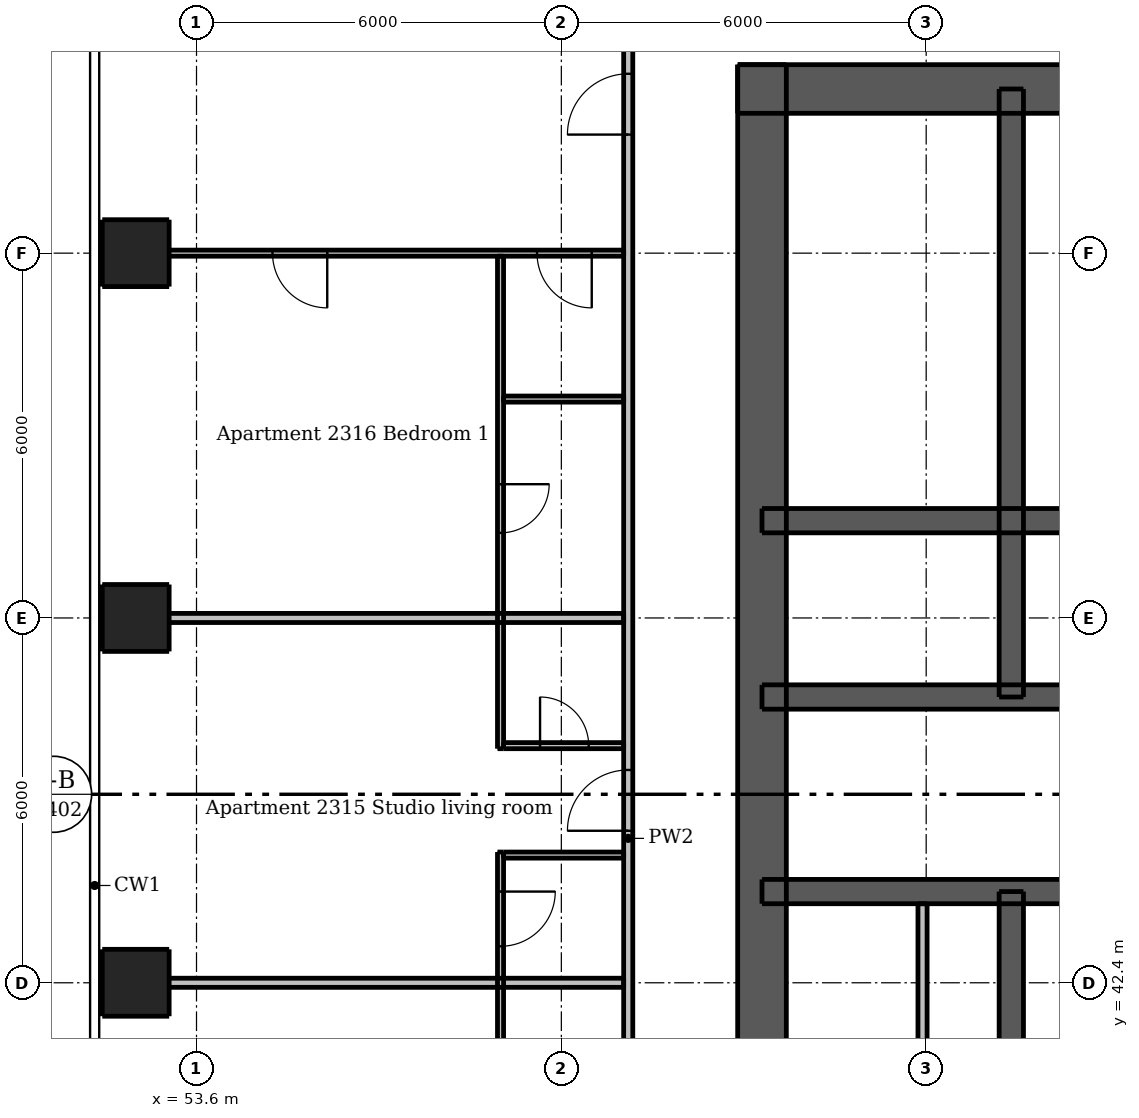
"""IFC4 building model, lengths in metres.
Left out: names, types, materials, properties, quantities, classifications, styles, units other than length and angle.
Written with IfcOpenShell. Run it as: python <this file> out.ifc"""

import sys

from ifc_helpers import new_model, si_unit, direction, frame, frame_2d, origin, origin_2d, place, context, subcontext, project, spatial, rectangle, extrude, element, fill, save


model = new_model("IFC4")
c1 = context("Model", 3, precision=1e-05, world=origin(), true_north=direction((0.0, 1.0)))
c2 = subcontext(c1, "Body", "Model", "MODEL_VIEW")
j1 = project(units=[si_unit("LENGTHUNIT", "METRE"), si_unit("PLANEANGLEUNIT", "RADIAN")], contexts=[c1])
p1 = place(None, origin())
s1 = spatial("IfcSite", under=j1, at=p1, CompositionType="ELEMENT")
p2 = place(p1, origin())
s2 = spatial("IfcBuilding", under=s1, at=p2, CompositionType="ELEMENT")
p3 = place(p2, frame((0.0, 0.0, 88.6)))
s3 = spatial("IfcBuildingStorey", under=s2, at=p3, CompositionType="ELEMENT", Elevation=88.6)
p4 = place(p3, frame((62.5, 57.1, 0.0), z_axis=(0.0, 0.0, 1.0), x_axis=(1.0, 0.0, 0.0)))
e1 = element("IfcWall", 1, at=p4, inside=s3, PredefinedType="SHEAR", context=c2, shape_type="SweptSolid", body=[
    extrude(rectangle(XDim=24.0, YDim=0.8, at=frame_2d((12.0, 0.0))), origin(), (0.0, 0.0, 1.0), 3.05),
])
p5 = place(p4, frame((20.9, 0.0, 0.0)))
e2 = element("IfcOpeningElement", 2, at=p5, cuts=e1, PredefinedType="OPENING", context=c2, shape_type="SweptSolid", body=[
    extrude(rectangle(XDim=1.1, YDim=2.1, at=frame_2d((0.55, 1.05))), frame((0.0, 0.41, 0.0), z_axis=(0.0, -1.0, 0.0), x_axis=(1.0, 0.0, 0.0)), (0.0, 0.0, 1.0), 0.82),
])
p6 = place(p4, frame((2.0, 0.0, 0.0)))
e3 = element("IfcOpeningElement", 3, at=p6, cuts=e1, PredefinedType="OPENING", context=c2, shape_type="SweptSolid", body=[
    extrude(rectangle(XDim=1.1, YDim=2.1, at=frame_2d((0.55, 1.05))), frame((0.0, 0.41, 0.0), z_axis=(0.0, -1.0, 0.0), x_axis=(1.0, 0.0, 0.0)), (0.0, 0.0, 1.0), 0.82),
])
p7 = place(p4, frame((11.55, 0.0, 0.0)))
e4 = element("IfcOpeningElement", 4, at=p7, cuts=e1, PredefinedType="OPENING", context=c2, shape_type="SweptSolid", body=[
    extrude(rectangle(XDim=0.9, YDim=2.1, at=frame_2d((0.45, 1.05))), frame((0.0, 0.41, 0.0), z_axis=(0.0, -1.0, 0.0), x_axis=(1.0, 0.0, 0.0)), (0.0, 0.0, 1.0), 0.82),
])
p8 = place(p3, frame((62.9, 33.5, 0.0), z_axis=(0.0, 0.0, 1.0), x_axis=(0.0, 1.0, 0.0)))
e5 = element("IfcWall", 5, at=p8, inside=s3, PredefinedType="SHEAR", context=c2, shape_type="SweptSolid", body=[
    extrude(rectangle(XDim=24.0, YDim=0.8, at=frame_2d((12.0, 0.0))), origin(), (0.0, 0.0, 1.0), 3.05),
])
p9 = place(p8, frame((11.2, 0.0, 0.0)))
e6 = element("IfcOpeningElement", 6, at=p9, cuts=e5, PredefinedType="OPENING", context=c2, shape_type="SweptSolid", body=[
    extrude(rectangle(XDim=1.6, YDim=2.1, at=frame_2d((0.8, 1.05))), frame((0.0, 0.41, 0.0), z_axis=(0.0, -1.0, 0.0), x_axis=(1.0, 0.0, 0.0)), (0.0, 0.0, 1.0), 0.82),
])
p10 = place(p3, frame((62.9, 43.9, 0.0), z_axis=(0.0, 0.0, 1.0), x_axis=(1.0, 0.0, 0.0)))
e7 = element("IfcWall", 7, at=p10, inside=s3, PredefinedType="SHEAR", context=c2, shape_type="SweptSolid", body=[
    extrude(rectangle(XDim=23.2, YDim=0.4, at=frame_2d((11.6, 0.0))), origin(), (0.0, 0.0, 1.0), 3.05),
])
p11 = place(p10, frame((1.07, 0.0, 0.0)))
e8 = element("IfcOpeningElement", 8, at=p11, cuts=e7, PredefinedType="OPENING", context=c2, shape_type="SweptSolid", body=[
    extrude(rectangle(XDim=0.9, YDim=2.1, at=frame_2d((0.45, 1.05))), frame((0.0, 0.21, 0.0), z_axis=(0.0, -1.0, 0.0), x_axis=(1.0, 0.0, 0.0)), (0.0, 0.0, 1.0), 0.42),
])
p12 = place(p10, frame((2.87, 0.0, 0.0)))
e9 = element("IfcOpeningElement", 9, at=p12, cuts=e7, PredefinedType="OPENING", context=c2, shape_type="SweptSolid", body=[
    extrude(rectangle(XDim=0.8, YDim=2.1, at=frame_2d((0.4, 1.05))), frame((0.0, 0.21, 0.0), z_axis=(0.0, -1.0, 0.0), x_axis=(1.0, 0.0, 0.0)), (0.0, 0.0, 1.0), 0.42),
])
p13 = place(p10, frame((20.6, 0.0, 0.0)))
e10 = element("IfcOpeningElement", 10, at=p13, cuts=e7, PredefinedType="OPENING", context=c2, shape_type="SweptSolid", body=[
    extrude(rectangle(XDim=0.9, YDim=2.1, at=frame_2d((0.45, 1.05))), frame((0.0, 0.21, 0.0), z_axis=(0.0, -1.0, 0.0), x_axis=(1.0, 0.0, 0.0)), (0.0, 0.0, 1.0), 0.42),
])
p14 = place(p10, frame((4.8, 0.0, 0.0)))
e11 = element("IfcOpeningElement", 11, at=p14, cuts=e7, PredefinedType="OPENING", context=c2, shape_type="SweptSolid", body=[
    extrude(rectangle(XDim=1.1, YDim=2.1, at=frame_2d((0.55, 1.05))), frame((0.0, 0.21, 0.0), z_axis=(0.0, -1.0, 0.0), x_axis=(1.0, 0.0, 0.0)), (0.0, 0.0, 1.0), 0.42),
])
p15 = place(p10, frame((7.3, 0.0, 0.0)))
e12 = element("IfcOpeningElement", 12, at=p15, cuts=e7, PredefinedType="OPENING", context=c2, shape_type="SweptSolid", body=[
    extrude(rectangle(XDim=1.1, YDim=2.1, at=frame_2d((0.55, 1.05))), frame((0.0, 0.21, 0.0), z_axis=(0.0, -1.0, 0.0), x_axis=(1.0, 0.0, 0.0)), (0.0, 0.0, 1.0), 0.42),
])
p16 = place(p10, frame((9.8, 0.0, 0.0)))
e13 = element("IfcOpeningElement", 13, at=p16, cuts=e7, PredefinedType="OPENING", context=c2, shape_type="SweptSolid", body=[
    extrude(rectangle(XDim=1.1, YDim=2.1, at=frame_2d((0.55, 1.05))), frame((0.0, 0.21, 0.0), z_axis=(0.0, -1.0, 0.0), x_axis=(1.0, 0.0, 0.0)), (0.0, 0.0, 1.0), 0.42),
])
p17 = place(p10, frame((12.3, 0.0, 0.0)))
e14 = element("IfcOpeningElement", 14, at=p17, cuts=e7, PredefinedType="OPENING", context=c2, shape_type="SweptSolid", body=[
    extrude(rectangle(XDim=1.1, YDim=2.1, at=frame_2d((0.55, 1.05))), frame((0.0, 0.21, 0.0), z_axis=(0.0, -1.0, 0.0), x_axis=(1.0, 0.0, 0.0)), (0.0, 0.0, 1.0), 0.42),
])
p18 = place(p10, frame((14.8, 0.0, 0.0)))
e15 = element("IfcOpeningElement", 15, at=p18, cuts=e7, PredefinedType="OPENING", context=c2, shape_type="SweptSolid", body=[
    extrude(rectangle(XDim=1.1, YDim=2.1, at=frame_2d((0.55, 1.05))), frame((0.0, 0.21, 0.0), z_axis=(0.0, -1.0, 0.0), x_axis=(1.0, 0.0, 0.0)), (0.0, 0.0, 1.0), 0.42),
])
p19 = place(p10, frame((17.3, 0.0, 0.0)))
e16 = element("IfcOpeningElement", 16, at=p19, cuts=e7, PredefinedType="OPENING", context=c2, shape_type="SweptSolid", body=[
    extrude(rectangle(XDim=1.1, YDim=2.1, at=frame_2d((0.55, 1.05))), frame((0.0, 0.21, 0.0), z_axis=(0.0, -1.0, 0.0), x_axis=(1.0, 0.0, 0.0)), (0.0, 0.0, 1.0), 0.42),
])
p20 = place(p3, frame((62.9, 47.1, 0.0), z_axis=(0.0, 0.0, 1.0), x_axis=(1.0, 0.0, 0.0)))
e17 = element("IfcWall", 17, at=p20, inside=s3, PredefinedType="SHEAR", context=c2, shape_type="SweptSolid", body=[
    extrude(rectangle(XDim=23.2, YDim=0.4, at=frame_2d((11.6, 0.0))), origin(), (0.0, 0.0, 1.0), 3.05),
])
p21 = place(p20, frame((1.7, 0.0, 0.0)))
e18 = element("IfcOpeningElement", 18, at=p21, cuts=e17, PredefinedType="OPENING", context=c2, shape_type="SweptSolid", body=[
    extrude(rectangle(XDim=0.9, YDim=2.1, at=frame_2d((0.45, 1.05))), frame((0.0, 0.21, 0.0), z_axis=(0.0, -1.0, 0.0), x_axis=(1.0, 0.0, 0.0)), (0.0, 0.0, 1.0), 0.42),
])
p22 = place(p20, frame((20.6, 0.0, 0.0)))
e19 = element("IfcOpeningElement", 19, at=p22, cuts=e17, PredefinedType="OPENING", context=c2, shape_type="SweptSolid", body=[
    extrude(rectangle(XDim=0.9, YDim=2.1, at=frame_2d((0.45, 1.05))), frame((0.0, 0.21, 0.0), z_axis=(0.0, -1.0, 0.0), x_axis=(1.0, 0.0, 0.0)), (0.0, 0.0, 1.0), 0.42),
])
p23 = place(p3, frame((62.9, 50.0, 0.0), z_axis=(0.0, 0.0, 1.0), x_axis=(1.0, 0.0, 0.0)))
e20 = element("IfcWall", 20, at=p23, inside=s3, PredefinedType="SHEAR", context=c2, shape_type="SweptSolid", body=[
    extrude(rectangle(XDim=23.2, YDim=0.4, at=frame_2d((11.6, 0.0))), origin(), (0.0, 0.0, 1.0), 3.05),
])
p24 = place(p3, frame((67.0, 33.9, 0.0), z_axis=(0.0, 0.0, 1.0), x_axis=(0.0, 1.0, 0.0)))
e21 = element("IfcWall", 21, at=p24, inside=s3, PredefinedType="SHEAR", context=c2, shape_type="SweptSolid", body=[
    extrude(rectangle(XDim=10.0, YDim=0.4, at=frame_2d((5.0, 0.0))), origin(), (0.0, 0.0, 1.0), 3.05),
])
p25 = place(p24, frame((0.6, 0.0, 0.0)))
e22 = element("IfcOpeningElement", 22, at=p25, cuts=e21, PredefinedType="OPENING", context=c2, shape_type="SweptSolid", body=[
    extrude(rectangle(XDim=1.1, YDim=2.1, at=frame_2d((0.55, 1.05))), frame((0.0, 0.21, 0.0), z_axis=(0.0, -1.0, 0.0), x_axis=(1.0, 0.0, 0.0)), (0.0, 0.0, 1.0), 0.42),
])
p26 = place(p3, frame((67.0, 47.1, 0.0), z_axis=(0.0, 0.0, 1.0), x_axis=(0.0, 1.0, 0.0)))
e23 = element("IfcWall", 23, at=p26, inside=s3, PredefinedType="SHEAR", context=c2, shape_type="SweptSolid", body=[
    extrude(rectangle(XDim=10.0, YDim=0.4, at=frame_2d((5.0, 0.0))), origin(), (0.0, 0.0, 1.0), 3.05),
])
for number, where, z_axis, x_axis in (
    (24, (52.6, 42.4, 0.0), (0.0, 0.0, 1.0), (1.0, 0.0, 0.0)),
    (25, (52.6, 48.4, 0.0), (0.0, 0.0, 1.0), (1.0, 0.0, 0.0)),
    (26, (52.6, 54.4, 0.0), (0.0, 0.0, 1.0), (1.0, 0.0, 0.0)),
):
    element("IfcColumn", number, at=place(p3, frame(where, z_axis=z_axis, x_axis=x_axis)), inside=s3, PredefinedType="COLUMN", context=c2, shape_type="SweptSolid", body=[
        extrude(rectangle(XDim=1.1, YDim=1.1, at=origin_2d()), origin(), (0.0, 0.0, 1.0), 3.05),
    ])
p27 = place(p3, frame((65.54, 41.2, 0.0), z_axis=(0.0, 0.0, 1.0), x_axis=(0.0, 1.0, 0.0)))
e27 = element("IfcWall", 27, at=p27, inside=s3, PredefinedType="PLUMBINGWALL", context=c2, shape_type="SweptSolid", body=[
    extrude(rectangle(XDim=2.5, YDim=0.15, at=frame_2d((1.25, 0.0))), origin(), (0.0, 0.0, 1.0), 3.05),
])
p28 = place(p3, frame((58.6, 44.55, 0.0), z_axis=(0.0, 0.0, 1.0), x_axis=(0.0, -1.0, 0.0)))
e28 = element("IfcWall", 28, at=p28, inside=s3, PredefinedType="PARTITIONING", context=c2, shape_type="SweptSolid", body=[
    extrude(rectangle(XDim=4.3, YDim=0.1, at=frame_2d((2.15, 0.0))), origin(), (0.0, 0.0, 1.0), 3.05),
])
p29 = place(p28, frame((0.65, 0.0, 0.0)))
e29 = element("IfcOpeningElement", 29, at=p29, cuts=e28, PredefinedType="OPENING", context=c2, shape_type="SweptSolid", body=[
    extrude(rectangle(XDim=0.9, YDim=2.1, at=frame_2d((0.45, 1.05))), frame((0.0, 0.06, 0.0), z_axis=(0.0, -1.0, 0.0), x_axis=(1.0, 0.0, 0.0)), (0.0, 0.0, 1.0), 0.12),
])
p30 = place(p3, frame((58.6, 54.35, 0.0), z_axis=(0.0, 0.0, 1.0), x_axis=(0.0, -1.0, 0.0)))
e30 = element("IfcWall", 30, at=p30, inside=s3, PredefinedType="PARTITIONING", context=c2, shape_type="SweptSolid", body=[
    extrude(rectangle(XDim=8.1, YDim=0.1, at=frame_2d((4.05, 0.0))), origin(), (0.0, 0.0, 1.0), 3.05),
])
p31 = place(p30, frame((3.75, 0.0, 0.0)))
e31 = element("IfcOpeningElement", 31, at=p31, cuts=e30, PredefinedType="OPENING", context=c2, shape_type="SweptSolid", body=[
    extrude(rectangle(XDim=0.8, YDim=2.1, at=frame_2d((0.4, 1.05))), frame((0.0, 0.06, 0.0), z_axis=(0.0, -1.0, 0.0), x_axis=(1.0, 0.0, 0.0)), (0.0, 0.0, 1.0), 0.12),
])
p32 = place(p3, frame((60.625, 54.4, 0.0), z_axis=(0.0, 0.0, 1.0), x_axis=(-1.0, 0.0, 0.0)))
e32 = element("IfcWall", 32, at=p32, inside=s3, PredefinedType="PARTITIONING", context=c2, shape_type="SweptSolid", body=[
    extrude(rectangle(XDim=8.625, YDim=0.1, at=frame_2d((4.312, 0.0))), origin(), (0.0, 0.0, 1.0), 2.516),
])
p33 = place(p32, frame((0.525, 0.0, 0.0)))
e33 = element("IfcOpeningElement", 33, at=p33, cuts=e32, PredefinedType="OPENING", context=c2, shape_type="SweptSolid", body=[
    extrude(rectangle(XDim=0.9, YDim=2.1, at=frame_2d((0.45, 1.05))), frame((0.0, 0.06, 0.0), z_axis=(0.0, -1.0, 0.0), x_axis=(1.0, 0.0, 0.0)), (0.0, 0.0, 1.0), 0.12),
])
p34 = place(p32, frame((4.875, 0.0, 0.0)))
e34 = element("IfcOpeningElement", 34, at=p34, cuts=e32, PredefinedType="OPENING", context=c2, shape_type="SweptSolid", body=[
    extrude(rectangle(XDim=0.9, YDim=2.1, at=frame_2d((0.45, 1.05))), frame((0.0, 0.06, 0.0), z_axis=(0.0, -1.0, 0.0), x_axis=(1.0, 0.0, 0.0)), (0.0, 0.0, 1.0), 0.12),
])
p35 = place(p3, frame((58.65, 52.0, 0.0), z_axis=(0.0, 0.0, 1.0), x_axis=(1.0, 0.0, 0.0)))
e35 = element("IfcWall", 35, at=p35, inside=s3, PredefinedType="PARTITIONING", context=c2, shape_type="SweptSolid", body=[
    extrude(rectangle(XDim=1.975, YDim=0.1, at=frame_2d((0.988, 0.0))), origin(), (0.0, 0.0, 1.0), 3.05),
])
p36 = place(p3, frame((58.65, 46.3, 0.0), z_axis=(0.0, 0.0, 1.0), x_axis=(1.0, 0.0, 0.0)))
e36 = element("IfcWall", 36, at=p36, inside=s3, PredefinedType="PARTITIONING", context=c2, shape_type="SweptSolid", body=[
    extrude(rectangle(XDim=1.975, YDim=0.1, at=frame_2d((0.988, 0.0))), origin(), (0.0, 0.0, 1.0), 3.05),
])
p37 = place(p36, frame((0.6, 0.0, 0.0)))
e37 = element("IfcOpeningElement", 37, at=p37, cuts=e36, PredefinedType="OPENING", context=c2, shape_type="SweptSolid", body=[
    extrude(rectangle(XDim=0.8, YDim=2.1, at=frame_2d((0.4, 1.05))), frame((0.0, 0.06, 0.0), z_axis=(0.0, -1.0, 0.0), x_axis=(1.0, 0.0, 0.0)), (0.0, 0.0, 1.0), 0.12),
])
p38 = place(p3, frame((58.65, 44.5, 0.0), z_axis=(0.0, 0.0, 1.0), x_axis=(1.0, 0.0, 0.0)))
e38 = element("IfcWall", 38, at=p38, inside=s3, PredefinedType="PARTITIONING", context=c2, shape_type="SweptSolid", body=[
    extrude(rectangle(XDim=1.975, YDim=0.1, at=frame_2d((0.988, 0.0))), origin(), (0.0, 0.0, 1.0), 3.05),
])
p39 = place(p3, frame((60.7, 30.325, 0.0), z_axis=(0.0, 0.0, 1.0), x_axis=(0.0, 1.0, 0.0)))
e39 = element("IfcWall", 39, at=p39, inside=s3, PredefinedType="PARTITIONING", context=c2, shape_type="SweptSolid", body=[
    extrude(rectangle(XDim=28.9, YDim=0.15, at=frame_2d((14.45, 0.0))), origin(), (0.0, 0.0, 1.0), 3.05),
])
p40 = place(p39, frame((2.575, 0.0, 0.0)))
e40 = element("IfcOpeningElement", 40, at=p40, cuts=e39, PredefinedType="OPENING", context=c2, shape_type="SweptSolid", body=[
    extrude(rectangle(XDim=1.0, YDim=2.1, at=frame_2d((0.5, 1.05))), frame((0.0, 0.085, 0.0), z_axis=(0.0, -1.0, 0.0), x_axis=(1.0, 0.0, 0.0)), (0.0, 0.0, 1.0), 0.17),
])
p41 = place(p39, frame((8.575, 0.0, 0.0)))
e41 = element("IfcOpeningElement", 41, at=p41, cuts=e39, PredefinedType="OPENING", context=c2, shape_type="SweptSolid", body=[
    extrude(rectangle(XDim=1.0, YDim=2.1, at=frame_2d((0.5, 1.05))), frame((0.0, 0.085, 0.0), z_axis=(0.0, -1.0, 0.0), x_axis=(1.0, 0.0, 0.0)), (0.0, 0.0, 1.0), 0.17),
])
p42 = place(p39, frame((14.575, 0.0, 0.0)))
e42 = element("IfcOpeningElement", 42, at=p42, cuts=e39, PredefinedType="OPENING", context=c2, shape_type="SweptSolid", body=[
    extrude(rectangle(XDim=1.0, YDim=2.1, at=frame_2d((0.5, 1.05))), frame((0.0, 0.085, 0.0), z_axis=(0.0, -1.0, 0.0), x_axis=(1.0, 0.0, 0.0)), (0.0, 0.0, 1.0), 0.17),
])
p43 = place(p39, frame((26.025, 0.0, 0.0)))
e43 = element("IfcOpeningElement", 43, at=p43, cuts=e39, PredefinedType="OPENING", context=c2, shape_type="SweptSolid", body=[
    extrude(rectangle(XDim=1.0, YDim=2.1, at=frame_2d((0.5, 1.05))), frame((0.0, 0.085, 0.0), z_axis=(0.0, -1.0, 0.0), x_axis=(1.0, 0.0, 0.0)), (0.0, 0.0, 1.0), 0.17),
])
for number, where, z_axis, x_axis in (
    (44, (52.0, 48.4, 0.0), (0.0, 0.0, 1.0), (1.0, 0.0, 0.0)),
    (45, (52.0, 42.4, 0.0), (0.0, 0.0, 1.0), (1.0, 0.0, 0.0)),
):
    element("IfcWall", number, at=place(p3, frame(where, z_axis=z_axis, x_axis=x_axis)), inside=s3, PredefinedType="PARTITIONING", context=c2, shape_type="SweptSolid", body=[
        extrude(rectangle(XDim=8.625, YDim=0.15, at=frame_2d((4.312, 0.0))), origin(), (0.0, 0.0, 1.0), 2.516),
    ])
p44 = place(p6, origin())
e46 = element("IfcDoor", 46, at=p44, inside=s3, OperationType="SINGLE_SWING_LEFT", PredefinedType="DOOR", context=c2, shape_type="SweptSolid", body=[
    extrude(rectangle(XDim=1.1, YDim=2.1, at=frame_2d((0.55, 1.05))), frame((0.0, -0.337, 0.0), z_axis=(0.0, -1.0, 0.0), x_axis=(1.0, 0.0, 0.0)), (0.0, 0.0, 1.0), 0.05),
])
fill(e3, e46)
p45 = place(p9, origin())
e47 = element("IfcDoor", 47, at=p45, inside=s3, OperationType="DOUBLE_DOOR_SINGLE_SWING", PredefinedType="DOOR", context=c2, shape_type="SweptSolid", body=[
    extrude(rectangle(XDim=1.6, YDim=2.1, at=frame_2d((0.8, 1.05))), frame((0.0, -0.337, 0.0), z_axis=(0.0, -1.0, 0.0), x_axis=(1.0, 0.0, 0.0)), (0.0, 0.0, 1.0), 0.05),
])
fill(e6, e47)
p46 = place(p11, origin())
e48 = element("IfcDoor", 48, at=p46, inside=s3, OperationType="SINGLE_SWING_LEFT", PredefinedType="DOOR", context=c2, shape_type="SweptSolid", body=[
    extrude(rectangle(XDim=0.9, YDim=2.1, at=frame_2d((0.45, 1.05))), frame((0.0, -0.138, 0.0), z_axis=(0.0, -1.0, 0.0), x_axis=(1.0, 0.0, 0.0)), (0.0, 0.0, 1.0), 0.05),
])
fill(e8, e48)
p47 = place(p12, origin())
e49 = element("IfcDoor", 49, at=p47, inside=s3, OperationType="SINGLE_SWING_RIGHT", PredefinedType="DOOR", context=c2, shape_type="SweptSolid", body=[
    extrude(rectangle(XDim=0.8, YDim=2.1, at=frame_2d((0.4, 1.05))), frame((0.0, -0.138, 0.0), z_axis=(0.0, -1.0, 0.0), x_axis=(1.0, 0.0, 0.0)), (0.0, 0.0, 1.0), 0.05),
])
fill(e9, e49)
p48 = place(p21, origin())
e50 = element("IfcDoor", 50, at=p48, inside=s3, OperationType="SINGLE_SWING_LEFT", PredefinedType="DOOR", context=c2, shape_type="SweptSolid", body=[
    extrude(rectangle(XDim=0.9, YDim=2.1, at=frame_2d((0.45, 1.05))), frame((0.0, 0.188, 0.0), z_axis=(0.0, -1.0, 0.0), x_axis=(1.0, 0.0, 0.0)), (0.0, 0.0, 1.0), 0.05),
])
fill(e18, e50)
p49 = place(p14, origin())
e51 = element("IfcDoor", 51, at=p49, inside=s3, OperationType="DOUBLE_DOOR_SLIDING", PredefinedType="DOOR", context=c2, shape_type="SweptSolid", body=[
    extrude(rectangle(XDim=1.1, YDim=2.1, at=frame_2d((0.55, 1.05))), frame((0.0, 0.025, 0.0), z_axis=(0.0, -1.0, 0.0), x_axis=(1.0, 0.0, 0.0)), (0.0, 0.0, 1.0), 0.05),
])
fill(e11, e51)
p50 = place(p42, origin())
e52 = element("IfcDoor", 52, at=p50, inside=s3, OperationType="SINGLE_SWING_LEFT", PredefinedType="DOOR", context=c2, shape_type="SweptSolid", body=[
    extrude(rectangle(XDim=1.0, YDim=2.1, at=frame_2d((0.5, 1.05))), frame((0.0, 0.025, 0.0), z_axis=(0.0, -1.0, 0.0), x_axis=(1.0, 0.0, 0.0)), (0.0, 0.0, 1.0), 0.05),
])
fill(e42, e52)
p51 = place(p29, origin())
e53 = element("IfcDoor", 53, at=p51, inside=s3, OperationType="SINGLE_SWING_LEFT", PredefinedType="DOOR", context=c2, shape_type="SweptSolid", body=[
    extrude(rectangle(XDim=0.9, YDim=2.1, at=frame_2d((0.45, 1.05))), frame((0.0, 0.025, 0.0), z_axis=(0.0, -1.0, 0.0), x_axis=(1.0, 0.0, 0.0)), (0.0, 0.0, 1.0), 0.05),
])
fill(e29, e53)
p52 = place(p37, origin())
e54 = element("IfcDoor", 54, at=p52, inside=s3, OperationType="SINGLE_SWING_LEFT", PredefinedType="DOOR", context=c2, shape_type="SweptSolid", body=[
    extrude(rectangle(XDim=0.8, YDim=2.1, at=frame_2d((0.4, 1.05))), frame((0.0, 0.025, 0.0), z_axis=(0.0, -1.0, 0.0), x_axis=(1.0, 0.0, 0.0)), (0.0, 0.0, 1.0), 0.05),
])
fill(e37, e54)
p53 = place(p43, origin())
e55 = element("IfcDoor", 55, at=p53, inside=s3, OperationType="SINGLE_SWING_LEFT", PredefinedType="DOOR", context=c2, shape_type="SweptSolid", body=[
    extrude(rectangle(XDim=1.0, YDim=2.1, at=frame_2d((0.5, 1.05))), frame((0.0, 0.025, 0.0), z_axis=(0.0, -1.0, 0.0), x_axis=(1.0, 0.0, 0.0)), (0.0, 0.0, 1.0), 0.05),
])
fill(e43, e55)
p54 = place(p33, origin())
e56 = element("IfcDoor", 56, at=p54, inside=s3, OperationType="SINGLE_SWING_LEFT", PredefinedType="DOOR", context=c2, shape_type="SweptSolid", body=[
    extrude(rectangle(XDim=0.9, YDim=2.1, at=frame_2d((0.45, 1.05))), frame((0.0, 0.025, 0.0), z_axis=(0.0, -1.0, 0.0), x_axis=(1.0, 0.0, 0.0)), (0.0, 0.0, 1.0), 0.05),
])
fill(e33, e56)
p55 = place(p34, origin())
e57 = element("IfcDoor", 57, at=p55, inside=s3, OperationType="SINGLE_SWING_LEFT", PredefinedType="DOOR", context=c2, shape_type="SweptSolid", body=[
    extrude(rectangle(XDim=0.9, YDim=2.1, at=frame_2d((0.45, 1.05))), frame((0.0, 0.025, 0.0), z_axis=(0.0, -1.0, 0.0), x_axis=(1.0, 0.0, 0.0)), (0.0, 0.0, 1.0), 0.05),
])
fill(e34, e57)
p56 = place(p31, origin())
e58 = element("IfcDoor", 58, at=p56, inside=s3, OperationType="SINGLE_SWING_LEFT", PredefinedType="DOOR", context=c2, shape_type="SweptSolid", body=[
    extrude(rectangle(XDim=0.8, YDim=2.1, at=frame_2d((0.4, 1.05))), frame((0.0, 0.025, 0.0), z_axis=(0.0, -1.0, 0.0), x_axis=(1.0, 0.0, 0.0)), (0.0, 0.0, 1.0), 0.05),
])
fill(e31, e58)
save(model, sys.argv[1])
